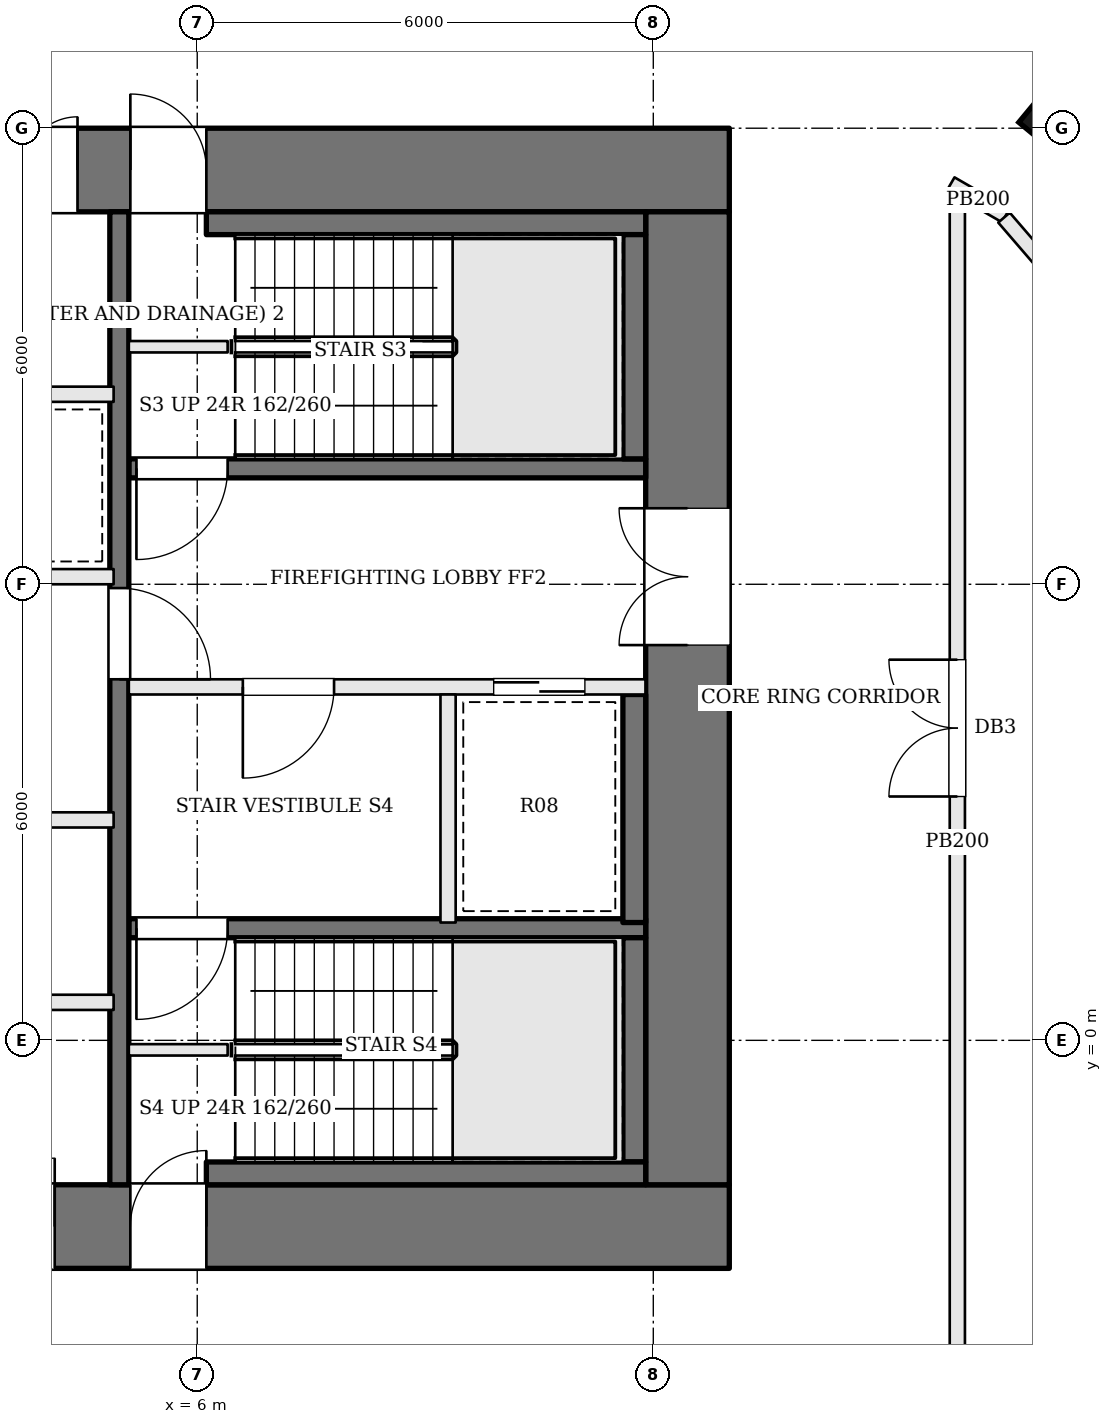
"""IFC4 building model, lengths in metres.
Left out: names, types, materials, properties, quantities, classifications, styles, units other than length and angle.
Written with IfcOpenShell. Run it as: python <this file> out.ifc"""

import sys

from ifc_helpers import new_model, si_unit, direction, frame, frame_2d, origin, origin_2d, place, context, subcontext, project, spatial, rectangle, extrude, element, fill, save


model = new_model("IFC4")
c1 = context("Model", 3, precision=1e-05, world=origin(), true_north=direction((0.0, 1.0)))
c2 = subcontext(c1, "Body", "Model", "MODEL_VIEW")
j1 = project(units=[si_unit("LENGTHUNIT", "METRE"), si_unit("PLANEANGLEUNIT", "RADIAN")], contexts=[c1])
p1 = place(None, origin())
s1 = spatial("IfcSite", under=j1, at=p1, CompositionType="ELEMENT")
p2 = place(p1, origin())
s2 = spatial("IfcBuilding", under=s1, at=p2, CompositionType="ELEMENT")
p3 = place(p2, frame((0.0, 0.0, 150.0)))
s3 = spatial("IfcBuildingStorey", under=s2, at=p3, CompositionType="ELEMENT", Elevation=150.0)
p4 = place(p3, frame((-13.0, 11.45, 0.0), z_axis=(0.0, 0.0, 1.0), x_axis=(1.0, 0.0, 0.0)))
e1 = element("IfcWall", 1, at=p4, inside=s3, PredefinedType="SHEAR", context=c2, shape_type="SweptSolid", body=[
    extrude(rectangle(XDim=26.0, YDim=1.1, at=frame_2d((13.0, 0.0))), origin(), (0.0, 0.0, 1.0), 3.9),
])
p5 = place(p4, frame((8.875, 0.0, 0.0)))
e2 = element("IfcOpeningElement", 2, at=p5, cuts=e1, PredefinedType="OPENING", context=c2, shape_type="SweptSolid", body=[
    extrude(rectangle(XDim=0.9, YDim=2.1, at=frame_2d((0.45, 1.05))), frame((0.0, 0.56, 0.0), z_axis=(0.0, -1.0, 0.0), x_axis=(1.0, 0.0, 0.0)), (0.0, 0.0, 1.0), 1.12),
])
p6 = place(p4, frame((11.425, 0.0, 0.0)))
e3 = element("IfcOpeningElement", 3, at=p6, cuts=e1, PredefinedType="OPENING", context=c2, shape_type="SweptSolid", body=[
    extrude(rectangle(XDim=0.7, YDim=2.1, at=frame_2d((0.35, 1.05))), frame((0.0, 0.56, 0.0), z_axis=(0.0, -1.0, 0.0), x_axis=(1.0, 0.0, 0.0)), (0.0, 0.0, 1.0), 1.12),
])
p7 = place(p4, frame((14.125, 0.0, 0.0)))
e4 = element("IfcOpeningElement", 4, at=p7, cuts=e1, PredefinedType="OPENING", context=c2, shape_type="SweptSolid", body=[
    extrude(rectangle(XDim=1.0, YDim=2.1, at=frame_2d((0.5, 1.05))), frame((0.0, 0.56, 0.0), z_axis=(0.0, -1.0, 0.0), x_axis=(1.0, 0.0, 0.0)), (0.0, 0.0, 1.0), 1.12),
])
p8 = place(p4, frame((16.725, 0.0, 0.0)))
e5 = element("IfcOpeningElement", 5, at=p8, cuts=e1, PredefinedType="OPENING", context=c2, shape_type="SweptSolid", body=[
    extrude(rectangle(XDim=0.7, YDim=2.1, at=frame_2d((0.35, 1.05))), frame((0.0, 0.56, 0.0), z_axis=(0.0, -1.0, 0.0), x_axis=(1.0, 0.0, 0.0)), (0.0, 0.0, 1.0), 1.12),
])
p9 = place(p4, frame((6.88, 0.0, 0.0)))
e6 = element("IfcOpeningElement", 6, at=p9, cuts=e1, PredefinedType="OPENING", context=c2, shape_type="SweptSolid", body=[
    extrude(rectangle(XDim=1.0, YDim=2.1, at=frame_2d((0.5, 1.05))), frame((0.0, 0.56, 0.0), z_axis=(0.0, -1.0, 0.0), x_axis=(1.0, 0.0, 0.0)), (0.0, 0.0, 1.0), 1.12),
])
p10 = place(p4, frame((18.12, 0.0, 0.0)))
e7 = element("IfcOpeningElement", 7, at=p10, cuts=e1, PredefinedType="OPENING", context=c2, shape_type="SweptSolid", body=[
    extrude(rectangle(XDim=1.0, YDim=2.1, at=frame_2d((0.5, 1.05))), frame((0.0, 0.56, 0.0), z_axis=(0.0, -1.0, 0.0), x_axis=(1.0, 0.0, 0.0)), (0.0, 0.0, 1.0), 1.12),
])
p11 = place(p3, frame((-13.0, -2.45, 0.0), z_axis=(0.0, 0.0, 1.0), x_axis=(1.0, 0.0, 0.0)))
e8 = element("IfcWall", 8, at=p11, inside=s3, PredefinedType="SHEAR", context=c2, shape_type="SweptSolid", body=[
    extrude(rectangle(XDim=26.0, YDim=1.1, at=frame_2d((13.0, 0.0))), origin(), (0.0, 0.0, 1.0), 3.9),
])
p12 = place(p11, frame((9.225, 0.0, 0.0)))
e9 = element("IfcOpeningElement", 9, at=p12, cuts=e8, PredefinedType="OPENING", context=c2, shape_type="SweptSolid", body=[
    extrude(rectangle(XDim=1.0, YDim=2.1, at=frame_2d((0.5, 1.05))), frame((0.0, 0.56, 0.0), z_axis=(0.0, -1.0, 0.0), x_axis=(1.0, 0.0, 0.0)), (0.0, 0.0, 1.0), 1.12),
])
p13 = place(p11, frame((11.825, 0.0, 0.0)))
e10 = element("IfcOpeningElement", 10, at=p13, cuts=e8, PredefinedType="OPENING", context=c2, shape_type="SweptSolid", body=[
    extrude(rectangle(XDim=0.7, YDim=2.1, at=frame_2d((0.35, 1.05))), frame((0.0, 0.56, 0.0), z_axis=(0.0, -1.0, 0.0), x_axis=(1.0, 0.0, 0.0)), (0.0, 0.0, 1.0), 1.12),
])
p14 = place(p11, frame((13.875, 0.0, 0.0)))
e11 = element("IfcOpeningElement", 11, at=p14, cuts=e8, PredefinedType="OPENING", context=c2, shape_type="SweptSolid", body=[
    extrude(rectangle(XDim=0.7, YDim=2.1, at=frame_2d((0.35, 1.05))), frame((0.0, 0.56, 0.0), z_axis=(0.0, -1.0, 0.0), x_axis=(1.0, 0.0, 0.0)), (0.0, 0.0, 1.0), 1.12),
])
p15 = place(p11, frame((16.225, 0.0, 0.0)))
e12 = element("IfcOpeningElement", 12, at=p15, cuts=e8, PredefinedType="OPENING", context=c2, shape_type="SweptSolid", body=[
    extrude(rectangle(XDim=0.9, YDim=2.1, at=frame_2d((0.45, 1.05))), frame((0.0, 0.56, 0.0), z_axis=(0.0, -1.0, 0.0), x_axis=(1.0, 0.0, 0.0)), (0.0, 0.0, 1.0), 1.12),
])
p16 = place(p11, frame((6.88, 0.0, 0.0)))
e13 = element("IfcOpeningElement", 13, at=p16, cuts=e8, PredefinedType="OPENING", context=c2, shape_type="SweptSolid", body=[
    extrude(rectangle(XDim=1.0, YDim=2.1, at=frame_2d((0.5, 1.05))), frame((0.0, 0.56, 0.0), z_axis=(0.0, -1.0, 0.0), x_axis=(1.0, 0.0, 0.0)), (0.0, 0.0, 1.0), 1.12),
])
p17 = place(p11, frame((18.12, 0.0, 0.0)))
e14 = element("IfcOpeningElement", 14, at=p17, cuts=e8, PredefinedType="OPENING", context=c2, shape_type="SweptSolid", body=[
    extrude(rectangle(XDim=1.0, YDim=2.1, at=frame_2d((0.5, 1.05))), frame((0.0, 0.56, 0.0), z_axis=(0.0, -1.0, 0.0), x_axis=(1.0, 0.0, 0.0)), (0.0, 0.0, 1.0), 1.12),
])
p18 = place(p3, frame((12.45, -1.9, 0.0), z_axis=(0.0, 0.0, 1.0), x_axis=(0.0, 1.0, 0.0)))
e15 = element("IfcWall", 15, at=p18, inside=s3, PredefinedType="SHEAR", context=c2, shape_type="SweptSolid", body=[
    extrude(rectangle(XDim=12.8, YDim=1.1, at=frame_2d((6.4, 0.0))), origin(), (0.0, 0.0, 1.0), 3.9),
])
p19 = place(p18, frame((7.1, 0.0, 0.0)))
e16 = element("IfcOpeningElement", 16, at=p19, cuts=e15, PredefinedType="OPENING", context=c2, shape_type="SweptSolid", body=[
    extrude(rectangle(XDim=1.8, YDim=2.1, at=frame_2d((0.9, 1.05))), frame((0.0, 0.56, 0.0), z_axis=(0.0, -1.0, 0.0), x_axis=(1.0, 0.0, 0.0)), (0.0, 0.0, 1.0), 1.12),
])
p20 = place(p3, frame((17.584, 12.151, 0.0), z_axis=(0.0, 0.0, 1.0), x_axis=(-0.770679191336, 0.637223339216, 0.0)))
e17 = element("IfcColumn", 17, at=p20, inside=s3, PredefinedType="COLUMN", context=c2, shape_type="SweptSolid", body=[
    extrude(rectangle(XDim=1.1, YDim=1.1, at=origin_2d()), origin(), (0.0, 0.0, 1.0), 3.9),
])
for number, where, z_axis, x_axis in (
    (18, (6.4, 9.125, 0.0), (0.0, 0.0, 1.0), (-1.0, 0.0, 0.0)),
    (19, (6.4, -0.125, 0.0), (0.0, 0.0, 1.0), (-1.0, 0.0, 0.0)),
):
    element("IfcWall", number, at=place(p3, frame(where, z_axis=z_axis, x_axis=x_axis)), inside=s3, PredefinedType="SOLIDWALL", context=c2, shape_type="SweptSolid", body=[
        extrude(rectangle(XDim=1.3, YDim=0.15, at=frame_2d((0.65, 0.0))), origin(), (0.0, 0.0, 1.0), 3.7),
    ])
p21 = place(p3, frame((11.9, 7.525, 0.0), z_axis=(0.0, 0.0, 1.0), x_axis=(-1.0, 0.0, 0.0)))
e20 = element("IfcWall", 20, at=p21, inside=s3, PredefinedType="SOLIDWALL", context=c2, shape_type="SweptSolid", body=[
    extrude(rectangle(XDim=6.8, YDim=0.25, at=frame_2d((3.4, 0.0))), origin(), (0.0, 0.0, 1.0), 3.7),
])
p22 = place(p21, frame((5.5, 0.0, 0.0)))
e21 = element("IfcOpeningElement", 21, at=p22, cuts=e20, PredefinedType="OPENING", context=c2, shape_type="SweptSolid", body=[
    extrude(rectangle(XDim=1.2, YDim=2.1, at=frame_2d((0.6, 1.05))), frame((0.0, 0.135, 0.0), z_axis=(0.0, -1.0, 0.0), x_axis=(1.0, 0.0, 0.0)), (0.0, 0.0, 1.0), 0.27),
])
p23 = place(p3, frame((11.9, 4.65, 0.0), z_axis=(0.0, 0.0, 1.0), x_axis=(-1.0, 0.0, 0.0)))
e22 = element("IfcWall", 22, at=p23, inside=s3, PredefinedType="SOLIDWALL", context=c2, shape_type="SweptSolid", body=[
    extrude(rectangle(XDim=6.8, YDim=0.2, at=frame_2d((3.4, 0.0))), origin(), (0.0, 0.0, 1.0), 3.7),
])
p24 = place(p23, frame((4.1, 0.0, 0.0)))
e23 = element("IfcOpeningElement", 23, at=p24, cuts=e22, PredefinedType="OPENING", context=c2, shape_type="SweptSolid", body=[
    extrude(rectangle(XDim=1.2, YDim=2.1, at=frame_2d((0.6, 1.05))), frame((0.0, 0.11, 0.0), z_axis=(0.0, -1.0, 0.0), x_axis=(1.0, 0.0, 0.0)), (0.0, 0.0, 1.0), 0.22),
])
p25 = place(p23, frame((0.8, 0.0, 0.0)))
e24 = element("IfcOpeningElement", 24, at=p25, cuts=e22, PredefinedType="OPENING", context=c2, shape_type="SweptSolid", body=[
    extrude(rectangle(XDim=1.2, YDim=2.1, at=frame_2d((0.6, 1.05))), frame((0.0, 0.11, 0.0), z_axis=(0.0, -1.0, 0.0), x_axis=(1.0, 0.0, 0.0)), (0.0, 0.0, 1.0), 0.22),
])
p26 = place(p3, frame((11.9, 1.475, 0.0), z_axis=(0.0, 0.0, 1.0), x_axis=(-1.0, 0.0, 0.0)))
e25 = element("IfcWall", 25, at=p26, inside=s3, PredefinedType="SOLIDWALL", context=c2, shape_type="SweptSolid", body=[
    extrude(rectangle(XDim=6.8, YDim=0.25, at=frame_2d((3.4, 0.0))), origin(), (0.0, 0.0, 1.0), 3.7),
])
p27 = place(p26, frame((5.5, 0.0, 0.0)))
e26 = element("IfcOpeningElement", 26, at=p27, cuts=e25, PredefinedType="OPENING", context=c2, shape_type="SweptSolid", body=[
    extrude(rectangle(XDim=1.2, YDim=2.1, at=frame_2d((0.6, 1.05))), frame((0.0, 0.135, 0.0), z_axis=(0.0, -1.0, 0.0), x_axis=(1.0, 0.0, 0.0)), (0.0, 0.0, 1.0), 0.27),
])
p28 = place(p3, frame((9.3, 4.55, 0.0), z_axis=(0.0, 0.0, 1.0), x_axis=(0.0, -1.0, 0.0)))
e27 = element("IfcWall", 27, at=p28, inside=s3, PredefinedType="SOLIDWALL", context=c2, shape_type="SweptSolid", body=[
    extrude(rectangle(XDim=3.0, YDim=0.2, at=frame_2d((1.5, 0.0))), origin(), (0.0, 0.0, 1.0), 3.7),
])
p29 = place(p3, frame((4.975, 10.9, 0.0), z_axis=(0.0, 0.0, 1.0), x_axis=(0.0, -1.0, 0.0)))
e28 = element("IfcWall", 28, at=p29, inside=s3, PredefinedType="SOLIDWALL", context=c2, shape_type="SweptSolid", body=[
    extrude(rectangle(XDim=12.8, YDim=0.25, at=frame_2d((6.4, 0.0))), origin(), (0.0, 0.0, 1.0), 3.7),
])
p30 = place(p29, frame((4.95, 0.0, 0.0)))
e29 = element("IfcOpeningElement", 29, at=p30, cuts=e28, PredefinedType="OPENING", context=c2, shape_type="SweptSolid", body=[
    extrude(rectangle(XDim=1.2, YDim=2.1, at=frame_2d((0.6, 1.05))), frame((0.0, 0.135, 0.0), z_axis=(0.0, -1.0, 0.0), x_axis=(1.0, 0.0, 0.0)), (0.0, 0.0, 1.0), 0.27),
])
p31 = place(p3, frame((11.9, 10.75, 0.0), z_axis=(0.0, 0.0, 1.0), x_axis=(-1.0, 0.0, 0.0)))
e30 = element("IfcWall", 30, at=p31, inside=s3, PredefinedType="SOLIDWALL", context=c2, shape_type="SweptSolid", body=[
    extrude(rectangle(XDim=5.78, YDim=0.3, at=frame_2d((2.89, 0.0))), origin(), (0.0, 0.0, 1.0), 3.7),
])
p32 = place(p3, frame((11.75, 10.6, 0.0), z_axis=(0.0, 0.0, 1.0), x_axis=(0.0, -1.0, 0.0)))
e31 = element("IfcWall", 31, at=p32, inside=s3, PredefinedType="SOLIDWALL", context=c2, shape_type="SweptSolid", body=[
    extrude(rectangle(XDim=2.95, YDim=0.3, at=frame_2d((1.475, 0.0))), origin(), (0.0, 0.0, 1.0), 3.7),
])
p33 = place(p3, frame((11.75, 4.55, 0.0), z_axis=(0.0, 0.0, 1.0), x_axis=(0.0, -1.0, 0.0)))
e32 = element("IfcWall", 32, at=p33, inside=s3, PredefinedType="SOLIDWALL", context=c2, shape_type="SweptSolid", body=[
    extrude(rectangle(XDim=3.0, YDim=0.3, at=frame_2d((1.5, 0.0))), origin(), (0.0, 0.0, 1.0), 3.7),
])
p34 = place(p3, frame((11.75, 1.35, 0.0), z_axis=(0.0, 0.0, 1.0), x_axis=(0.0, -1.0, 0.0)))
e33 = element("IfcWall", 33, at=p34, inside=s3, PredefinedType="SOLIDWALL", context=c2, shape_type="SweptSolid", body=[
    extrude(rectangle(XDim=2.95, YDim=0.3, at=frame_2d((1.475, 0.0))), origin(), (0.0, 0.0, 1.0), 3.7),
])
p35 = place(p3, frame((11.9, -1.75, 0.0), z_axis=(0.0, 0.0, 1.0), x_axis=(-1.0, 0.0, 0.0)))
e34 = element("IfcWall", 34, at=p35, inside=s3, PredefinedType="SOLIDWALL", context=c2, shape_type="SweptSolid", body=[
    extrude(rectangle(XDim=5.78, YDim=0.3, at=frame_2d((2.89, 0.0))), origin(), (0.0, 0.0, 1.0), 3.7),
])
p36 = place(p3, frame((-4.9, 0.5, 0.0), z_axis=(0.0, 0.0, 1.0), x_axis=(1.0, 0.0, 0.0)))
e35 = element("IfcWall", 35, at=p36, inside=s3, PredefinedType="SOLIDWALL", context=c2, shape_type="SweptSolid", body=[
    extrude(rectangle(XDim=9.8, YDim=0.2, at=frame_2d((4.9, 0.0))), origin(), (0.0, 0.0, 1.0), 3.7),
])
p37 = place(p3, frame((-4.9, 2.9, 0.0), z_axis=(0.0, 0.0, 1.0), x_axis=(1.0, 0.0, 0.0)))
e36 = element("IfcWall", 36, at=p37, inside=s3, PredefinedType="SOLIDWALL", context=c2, shape_type="SweptSolid", body=[
    extrude(rectangle(XDim=9.8, YDim=0.2, at=frame_2d((4.9, 0.0))), origin(), (0.0, 0.0, 1.0), 3.7),
])
p38 = place(p37, frame((2.613, 0.0, 0.0)))
e37 = element("IfcOpeningElement", 37, at=p38, cuts=e36, PredefinedType="OPENING", context=c2, shape_type="SweptSolid", body=[
    extrude(rectangle(XDim=0.9, YDim=2.1, at=frame_2d((0.45, 1.05))), frame((0.0, 0.11, 0.0), z_axis=(0.0, -1.0, 0.0), x_axis=(1.0, 0.0, 0.0)), (0.0, 0.0, 1.0), 0.22),
])
p39 = place(p37, frame((7.463, 0.0, 0.0)))
e38 = element("IfcOpeningElement", 38, at=p39, cuts=e36, PredefinedType="OPENING", context=c2, shape_type="SweptSolid", body=[
    extrude(rectangle(XDim=1.0, YDim=2.1, at=frame_2d((0.5, 1.05))), frame((0.0, 0.11, 0.0), z_axis=(0.0, -1.0, 0.0), x_axis=(1.0, 0.0, 0.0)), (0.0, 0.0, 1.0), 0.22),
])
for number, where, z_axis, x_axis in (
    (39, (-4.9, 6.1, 0.0), (0.0, 0.0, 1.0), (1.0, 0.0, 0.0)),
    (40, (-4.9, 8.5, 0.0), (0.0, 0.0, 1.0), (1.0, 0.0, 0.0)),
):
    element("IfcWall", number, at=place(p3, frame(where, z_axis=z_axis, x_axis=x_axis)), inside=s3, PredefinedType="SOLIDWALL", context=c2, shape_type="SweptSolid", body=[
        extrude(rectangle(XDim=9.8, YDim=0.2, at=frame_2d((4.9, 0.0))), origin(), (0.0, 0.0, 1.0), 3.7),
    ])
p40 = place(p3, frame((15.913, 11.267, 0.0), z_axis=(0.0, 0.0, 1.0), x_axis=(0.866219676164, -0.4996633593, 0.0)))
e41 = element("IfcWall", 41, at=p40, inside=s3, PredefinedType="PARTITIONING", context=c2, shape_type="SweptSolid", body=[
    extrude(rectangle(XDim=0.834, YDim=0.2, at=frame_2d((0.417, 0.0))), origin(), (0.0, 0.0, 1.0), 3.7),
])
p41 = place(p3, frame((16.614, 10.824, 0.0), z_axis=(0.0, 0.0, 1.0), x_axis=(0.652570543166, -0.757727976382, 0.0)))
e42 = element("IfcWall", 42, at=p41, inside=s3, PredefinedType="PARTITIONING", context=c2, shape_type="SweptSolid", body=[
    extrude(rectangle(XDim=4.764, YDim=0.2, at=frame_2d((2.382, 0.0))), origin(), (0.0, 0.0, 1.0), 3.7),
])
p42 = place(p3, frame((16.0, -5.9, 0.0), z_axis=(0.0, 0.0, 1.0), x_axis=(0.0, 1.0, 0.0)))
e43 = element("IfcWall", 43, at=p42, inside=s3, PredefinedType="PARTITIONING", context=c2, shape_type="SweptSolid", body=[
    extrude(rectangle(XDim=17.017, YDim=0.2, at=frame_2d((8.508, 0.0))), origin(), (0.0, 0.0, 1.0), 3.7),
])
p43 = place(p42, frame((9.108, 0.0, 0.0)))
e44 = element("IfcOpeningElement", 44, at=p43, cuts=e43, PredefinedType="OPENING", context=c2, shape_type="SweptSolid", body=[
    extrude(rectangle(XDim=1.8, YDim=2.1, at=frame_2d((0.9, 1.05))), frame((0.0, 0.11, 0.0), z_axis=(0.0, -1.0, 0.0), x_axis=(1.0, 0.0, 0.0)), (0.0, 0.0, 1.0), 0.22),
])
p44 = place(p19, origin())
e45 = element("IfcDoor", 45, at=p44, inside=s3, OperationType="DOUBLE_DOOR_SINGLE_SWING", PredefinedType="DOOR", context=c2, shape_type="SweptSolid", body=[
    extrude(rectangle(XDim=1.8, YDim=2.1, at=frame_2d((0.9, 1.05))), frame((0.0, 0.025, 0.0), z_axis=(0.0, -1.0, 0.0), x_axis=(1.0, 0.0, 0.0)), (0.0, 0.0, 1.0), 0.05),
])
fill(e16, e45)
p45 = place(p30, origin())
e46 = element("IfcDoor", 46, at=p45, inside=s3, OperationType="SINGLE_SWING_RIGHT", PredefinedType="DOOR", context=c2, shape_type="SweptSolid", body=[
    extrude(rectangle(XDim=1.2, YDim=2.1, at=frame_2d((0.6, 1.05))), frame((0.0, 0.025, 0.0), z_axis=(0.0, -1.0, 0.0), x_axis=(1.0, 0.0, 0.0)), (0.0, 0.0, 1.0), 0.05),
])
fill(e29, e46)
p46 = place(p24, origin())
e47 = element("IfcDoor", 47, at=p46, inside=s3, OperationType="SINGLE_SWING_RIGHT", PredefinedType="DOOR", context=c2, shape_type="SweptSolid", body=[
    extrude(rectangle(XDim=1.2, YDim=2.1, at=frame_2d((0.6, 1.05))), frame((0.0, 0.025, 0.0), z_axis=(0.0, -1.0, 0.0), x_axis=(1.0, 0.0, 0.0)), (0.0, 0.0, 1.0), 0.05),
])
fill(e23, e47)
p47 = place(p22, origin())
e48 = element("IfcDoor", 48, at=p47, inside=s3, OperationType="SINGLE_SWING_RIGHT", PredefinedType="DOOR", context=c2, shape_type="SweptSolid", body=[
    extrude(rectangle(XDim=1.2, YDim=2.1, at=frame_2d((0.6, 1.05))), frame((0.0, 0.025, 0.0), z_axis=(0.0, -1.0, 0.0), x_axis=(1.0, 0.0, 0.0)), (0.0, 0.0, 1.0), 0.05),
])
fill(e21, e48)
p48 = place(p27, origin())
e49 = element("IfcDoor", 49, at=p48, inside=s3, OperationType="SINGLE_SWING_RIGHT", PredefinedType="DOOR", context=c2, shape_type="SweptSolid", body=[
    extrude(rectangle(XDim=1.2, YDim=2.1, at=frame_2d((0.6, 1.05))), frame((0.0, 0.025, 0.0), z_axis=(0.0, -1.0, 0.0), x_axis=(1.0, 0.0, 0.0)), (0.0, 0.0, 1.0), 0.05),
])
fill(e26, e49)
p49 = place(p25, origin())
e50 = element("IfcDoor", 50, at=p49, inside=s3, OperationType="SLIDING_TO_RIGHT", PredefinedType="DOOR", context=c2, shape_type="SweptSolid", body=[
    extrude(rectangle(XDim=1.2, YDim=2.1, at=frame_2d((0.6, 1.05))), frame((0.0, 0.025, 0.0), z_axis=(0.0, -1.0, 0.0), x_axis=(1.0, 0.0, 0.0)), (0.0, 0.0, 1.0), 0.05),
])
fill(e24, e50)
p50 = place(p15, origin())
e51 = element("IfcDoor", 51, at=p50, inside=s3, OperationType="SINGLE_SWING_RIGHT", PredefinedType="DOOR", context=c2, shape_type="SweptSolid", body=[
    extrude(rectangle(XDim=0.9, YDim=2.1, at=frame_2d((0.45, 1.05))), frame((0.0, 0.025, 0.0), z_axis=(0.0, -1.0, 0.0), x_axis=(1.0, 0.0, 0.0)), (0.0, 0.0, 1.0), 0.05),
])
fill(e12, e51)
p51 = place(p8, origin())
e52 = element("IfcDoor", 52, at=p51, inside=s3, OperationType="SINGLE_SWING_RIGHT", PredefinedType="DOOR", context=c2, shape_type="SweptSolid", body=[
    extrude(rectangle(XDim=0.7, YDim=2.1, at=frame_2d((0.35, 1.05))), frame((0.0, 0.025, 0.0), z_axis=(0.0, -1.0, 0.0), x_axis=(1.0, 0.0, 0.0)), (0.0, 0.0, 1.0), 0.05),
])
fill(e5, e52)
p52 = place(p10, origin())
e53 = element("IfcDoor", 53, at=p52, inside=s3, OperationType="SINGLE_SWING_LEFT", PredefinedType="DOOR", context=c2, shape_type="SweptSolid", body=[
    extrude(rectangle(XDim=1.0, YDim=2.1, at=frame_2d((0.5, 1.05))), frame((0.0, 0.025, 0.0), z_axis=(0.0, -1.0, 0.0), x_axis=(1.0, 0.0, 0.0)), (0.0, 0.0, 1.0), 0.05),
])
fill(e7, e53)
p53 = place(p17, origin())
e54 = element("IfcDoor", 54, at=p53, inside=s3, OperationType="SINGLE_SWING_RIGHT", PredefinedType="DOOR", context=c2, shape_type="SweptSolid", body=[
    extrude(rectangle(XDim=1.0, YDim=2.1, at=frame_2d((0.5, 1.05))), frame((0.0, 0.025, 0.0), z_axis=(0.0, -1.0, 0.0), x_axis=(1.0, 0.0, 0.0)), (0.0, 0.0, 1.0), 0.05),
])
fill(e14, e54)
p54 = place(p43, origin())
e55 = element("IfcDoor", 55, at=p54, inside=s3, OperationType="DOUBLE_DOOR_SINGLE_SWING", PredefinedType="DOOR", context=c2, shape_type="SweptSolid", body=[
    extrude(rectangle(XDim=1.8, YDim=2.1, at=frame_2d((0.9, 1.05))), frame((0.0, 0.025, 0.0), z_axis=(0.0, -1.0, 0.0), x_axis=(1.0, 0.0, 0.0)), (0.0, 0.0, 1.0), 0.05),
])
fill(e44, e55)
save(model, sys.argv[1])
